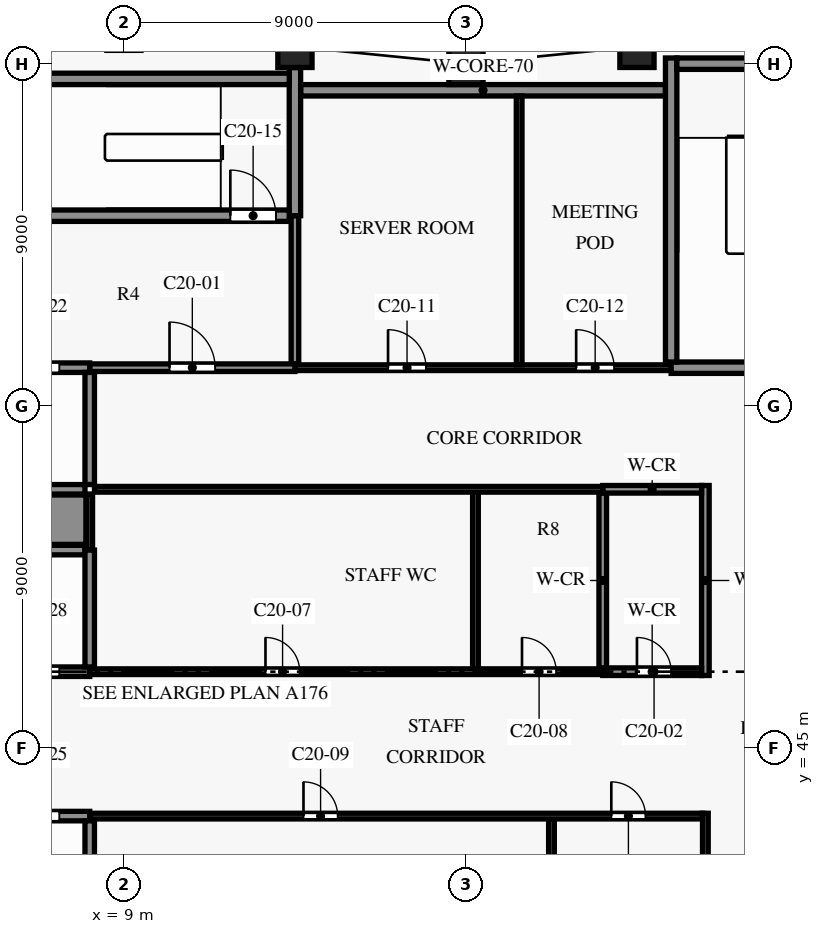
"""IFC4 building model, lengths in metres.
Left out: names, types, materials, properties, quantities, classifications, styles, units other than length and angle.
Written with IfcOpenShell. Run it as: python <this file> out.ifc"""

import sys

from ifc_helpers import new_model, si_unit, direction, frame, frame_2d, origin, origin_2d, place, context, subcontext, project, spatial, rectangle, extrude, element, fill, save


model = new_model("IFC4")
c1 = context("Model", 3, precision=1e-05, world=origin(), true_north=direction((0.0, 1.0)))
c2 = subcontext(c1, "Body", "Model", "MODEL_VIEW")
j1 = project(units=[si_unit("LENGTHUNIT", "METRE"), si_unit("PLANEANGLEUNIT", "RADIAN")], contexts=[c1])
p1 = place(None, origin())
s1 = spatial("IfcSite", under=j1, at=p1, CompositionType="ELEMENT")
p2 = place(p1, origin())
s2 = spatial("IfcBuilding", under=s1, at=p2, CompositionType="ELEMENT")
p3 = place(p2, frame((0.0, 0.0, 143.4)))
s3 = spatial("IfcBuildingStorey", under=s2, at=p3, CompositionType="ELEMENT", Elevation=143.4)
for number, where, z_axis, x_axis in (
    (1, (22.5, 63.45, 0.0), (0.0, 0.0, 1.0), (-0.995, -0.1, 0.0)),
    (2, (18.0, 63.0, 0.0), (0.0, 0.0, 1.0), (-1.0, 0.0, 0.0)),
    (3, (13.5, 63.45, 0.0), (0.0, 0.0, 1.0), (-0.995, 0.1, 0.0)),
):
    element("IfcColumn", number, at=place(p3, frame(where, z_axis=z_axis, x_axis=x_axis)), inside=s3, PredefinedType="COLUMN", context=c2, shape_type="SweptSolid", body=[
        extrude(rectangle(XDim=0.9, YDim=1.1, at=origin_2d()), origin(), (0.0, 0.0, 1.0), 3.8),
    ])
p4 = place(p3, frame((8.1, 43.2, 0.0), z_axis=(0.0, 0.0, 1.0), x_axis=(1.0, 0.0, 0.0)))
e4 = element("IfcWall", 4, at=p4, inside=s3, PredefinedType="PARTITIONING", context=c2, shape_type="SweptSolid", body=[
    extrude(rectangle(XDim=16.125, YDim=0.15, at=frame_2d((8.062, 0.0))), origin(), (0.0, 0.0, 1.0), 3.5),
])
p5 = place(p4, frame((5.625, 0.0, 0.0)))
e5 = element("IfcOpeningElement", 5, at=p5, cuts=e4, PredefinedType="OPENING", context=c2, shape_type="SweptSolid", body=[
    extrude(rectangle(XDim=0.9, YDim=2.1, at=frame_2d((0.45, 1.05))), frame((0.0, 0.085, 0.0), z_axis=(0.0, -1.0, 0.0), x_axis=(1.0, 0.0, 0.0)), (0.0, 0.0, 1.0), 0.17),
])
p6 = place(p4, frame((13.725, 0.0, 0.0)))
e6 = element("IfcOpeningElement", 6, at=p6, cuts=e4, PredefinedType="OPENING", context=c2, shape_type="SweptSolid", body=[
    extrude(rectangle(XDim=0.9, YDim=2.1, at=frame_2d((0.45, 1.05))), frame((0.0, 0.085, 0.0), z_axis=(0.0, -1.0, 0.0), x_axis=(1.0, 0.0, 0.0)), (0.0, 0.0, 1.0), 0.17),
])
p7 = place(p3, frame((0.125, 43.2, 0.0), z_axis=(0.0, 0.0, 1.0), x_axis=(1.0, 0.0, 0.0)))
e7 = element("IfcWall", 7, at=p7, inside=s3, PredefinedType="SHEAR", context=c2, shape_type="SweptSolid", body=[
    extrude(rectangle(XDim=7.975, YDim=0.25, at=frame_2d((3.988, 0.0))), origin(), (0.0, 0.0, 1.0), 3.5),
])
p8 = place(p7, frame((0.675, 0.0, 0.0)))
e8 = element("IfcOpeningElement", 8, at=p8, cuts=e7, PredefinedType="OPENING", context=c2, shape_type="SweptSolid", body=[
    extrude(rectangle(XDim=1.1, YDim=2.1, at=frame_2d((0.55, 1.05))), frame((0.0, 0.135, 0.0), z_axis=(0.0, -1.0, 0.0), x_axis=(1.0, 0.0, 0.0)), (0.0, 0.0, 1.0), 0.27),
])
p9 = place(p7, frame((3.375, 0.0, 0.0)))
e9 = element("IfcOpeningElement", 9, at=p9, cuts=e7, PredefinedType="OPENING", context=c2, shape_type="SweptSolid", body=[
    extrude(rectangle(XDim=1.1, YDim=2.1, at=frame_2d((0.55, 1.05))), frame((0.0, 0.135, 0.0), z_axis=(0.0, -1.0, 0.0), x_axis=(1.0, 0.0, 0.0)), (0.0, 0.0, 1.0), 0.27),
])
p10 = place(p7, frame((6.075, 0.0, 0.0)))
e10 = element("IfcOpeningElement", 10, at=p10, cuts=e7, PredefinedType="OPENING", context=c2, shape_type="SweptSolid", body=[
    extrude(rectangle(XDim=1.1, YDim=2.1, at=frame_2d((0.55, 1.05))), frame((0.0, 0.135, 0.0), z_axis=(0.0, -1.0, 0.0), x_axis=(1.0, 0.0, 0.0)), (0.0, 0.0, 1.0), 0.27),
])
p11 = place(p3, frame((8.1, 47.0, 0.0), z_axis=(0.0, 0.0, 1.0), x_axis=(1.0, 0.0, 0.0)))
e11 = element("IfcWall", 11, at=p11, inside=s3, PredefinedType="PARTITIONING", context=c2, shape_type="SweptSolid", body=[
    extrude(rectangle(XDim=13.5, YDim=0.15, at=frame_2d((6.75, 0.0))), origin(), (0.0, 0.0, 1.0), 3.5),
])
p12 = place(p11, frame((4.625, 0.0, 0.0)))
e12 = element("IfcOpeningElement", 12, at=p12, cuts=e11, PredefinedType="OPENING", context=c2, shape_type="SweptSolid", body=[
    extrude(rectangle(XDim=0.9, YDim=2.1, at=frame_2d((0.45, 1.05))), frame((0.0, 0.085, 0.0), z_axis=(0.0, -1.0, 0.0), x_axis=(1.0, 0.0, 0.0)), (0.0, 0.0, 1.0), 0.17),
])
p13 = place(p11, frame((11.375, 0.0, 0.0)))
e13 = element("IfcOpeningElement", 13, at=p13, cuts=e11, PredefinedType="OPENING", context=c2, shape_type="SweptSolid", body=[
    extrude(rectangle(XDim=0.9, YDim=2.1, at=frame_2d((0.45, 1.05))), frame((0.0, 0.085, 0.0), z_axis=(0.0, -1.0, 0.0), x_axis=(1.0, 0.0, 0.0)), (0.0, 0.0, 1.0), 0.17),
])
p14 = place(p3, frame((21.6, 47.0, 0.0), z_axis=(0.0, 0.0, 1.0), x_axis=(1.0, 0.0, 0.0)))
e14 = element("IfcWall", 14, at=p14, inside=s3, PredefinedType="PARTITIONING", context=c2, shape_type="SweptSolid", body=[
    extrude(rectangle(XDim=2.6, YDim=0.2, at=frame_2d((1.3, 0.0))), origin(), (0.0, 0.0, 1.0), 3.5),
])
p15 = place(p14, frame((0.9, 0.0, 0.0)))
e15 = element("IfcOpeningElement", 15, at=p15, cuts=e14, PredefinedType="OPENING", context=c2, shape_type="SweptSolid", body=[
    extrude(rectangle(XDim=0.9, YDim=2.1, at=frame_2d((0.45, 1.05))), frame((0.0, 0.11, 0.0), z_axis=(0.0, -1.0, 0.0), x_axis=(1.0, 0.0, 0.0)), (0.0, 0.0, 1.0), 0.22),
])
p16 = place(p3, frame((0.125, 47.0, 0.0), z_axis=(0.0, 0.0, 1.0), x_axis=(1.0, 0.0, 0.0)))
e16 = element("IfcWall", 16, at=p16, inside=s3, PredefinedType="SHEAR", context=c2, shape_type="SweptSolid", body=[
    extrude(rectangle(XDim=7.975, YDim=0.25, at=frame_2d((3.988, 0.0))), origin(), (0.0, 0.0, 1.0), 3.5),
])
p17 = place(p16, frame((0.675, 0.0, 0.0)))
e17 = element("IfcOpeningElement", 17, at=p17, cuts=e16, PredefinedType="OPENING", context=c2, shape_type="SweptSolid", body=[
    extrude(rectangle(XDim=1.1, YDim=2.1, at=frame_2d((0.55, 1.05))), frame((0.0, 0.135, 0.0), z_axis=(0.0, -1.0, 0.0), x_axis=(1.0, 0.0, 0.0)), (0.0, 0.0, 1.0), 0.27),
])
p18 = place(p16, frame((3.375, 0.0, 0.0)))
e18 = element("IfcOpeningElement", 18, at=p18, cuts=e16, PredefinedType="OPENING", context=c2, shape_type="SweptSolid", body=[
    extrude(rectangle(XDim=1.1, YDim=2.1, at=frame_2d((0.55, 1.05))), frame((0.0, 0.135, 0.0), z_axis=(0.0, -1.0, 0.0), x_axis=(1.0, 0.0, 0.0)), (0.0, 0.0, 1.0), 0.27),
])
p19 = place(p16, frame((6.075, 0.0, 0.0)))
e19 = element("IfcOpeningElement", 19, at=p19, cuts=e16, PredefinedType="OPENING", context=c2, shape_type="SweptSolid", body=[
    extrude(rectangle(XDim=1.1, YDim=2.1, at=frame_2d((0.55, 1.05))), frame((0.0, 0.135, 0.0), z_axis=(0.0, -1.0, 0.0), x_axis=(1.0, 0.0, 0.0)), (0.0, 0.0, 1.0), 0.27),
])
p20 = place(p3, frame((0.125, 50.2, 0.0), z_axis=(0.0, 0.0, 1.0), x_axis=(1.0, 0.0, 0.0)))
e20 = element("IfcWall", 20, at=p20, inside=s3, PredefinedType="SHEAR", context=c2, shape_type="SweptSolid", body=[
    extrude(rectangle(XDim=7.85, YDim=0.25, at=frame_2d((3.925, 0.0))), origin(), (0.0, 0.0, 1.0), 3.5),
])
p21 = place(p3, frame((-0.125, 51.0, 0.0), z_axis=(0.0, 0.0, 1.0), x_axis=(1.0, 0.0, 0.0)))
e21 = element("IfcWall", 21, at=p21, inside=s3, PredefinedType="SHEAR", context=c2, shape_type="SweptSolid", body=[
    extrude(rectangle(XDim=8.125, YDim=1.3, at=frame_2d((4.062, 0.0))), origin(), (0.0, 0.0, 1.0), 3.5),
])
p22 = place(p3, frame((8.225, 51.8, 0.0), z_axis=(0.0, 0.0, 1.0), x_axis=(1.0, 0.0, 0.0)))
e22 = element("IfcWall", 22, at=p22, inside=s3, PredefinedType="PARTITIONING", context=c2, shape_type="SweptSolid", body=[
    extrude(rectangle(XDim=13.375, YDim=0.15, at=frame_2d((6.688, 0.0))), origin(), (0.0, 0.0, 1.0), 3.5),
])
p23 = place(p3, frame((21.6, 51.8, 0.0), z_axis=(0.0, 0.0, 1.0), x_axis=(1.0, 0.0, 0.0)))
e23 = element("IfcWall", 23, at=p23, inside=s3, PredefinedType="PARTITIONING", context=c2, shape_type="SweptSolid", body=[
    extrude(rectangle(XDim=2.6, YDim=0.2, at=frame_2d((1.3, 0.0))), origin(), (0.0, 0.0, 1.0), 3.5),
])
p24 = place(p3, frame((0.125, 51.8, 0.0), z_axis=(0.0, 0.0, 1.0), x_axis=(1.0, 0.0, 0.0)))
e24 = element("IfcWall", 24, at=p24, inside=s3, PredefinedType="SHEAR", context=c2, shape_type="SweptSolid", body=[
    extrude(rectangle(XDim=7.85, YDim=0.25, at=frame_2d((3.925, 0.0))), origin(), (0.0, 0.0, 1.0), 3.5),
])
p25 = place(p3, frame((8.1, 55.0, 0.0), z_axis=(0.0, 0.0, 1.0), x_axis=(1.0, 0.0, 0.0)))
e25 = element("IfcWall", 25, at=p25, inside=s3, PredefinedType="PARTITIONING", context=c2, shape_type="SweptSolid", body=[
    extrude(rectangle(XDim=5.4, YDim=0.2, at=frame_2d((2.7, 0.0))), origin(), (0.0, 0.0, 1.0), 3.5),
])
p26 = place(p25, frame((2.1, 0.0, 0.0)))
e26 = element("IfcOpeningElement", 26, at=p26, cuts=e25, PredefinedType="OPENING", context=c2, shape_type="SweptSolid", body=[
    extrude(rectangle(XDim=1.2, YDim=2.2, at=frame_2d((0.6, 1.1))), frame((0.0, 0.11, 0.0), z_axis=(0.0, -1.0, 0.0), x_axis=(1.0, 0.0, 0.0)), (0.0, 0.0, 1.0), 0.22),
])
p27 = place(p3, frame((13.5, 55.0, 0.0), z_axis=(0.0, 0.0, 1.0), x_axis=(1.0, 0.0, 0.0)))
e27 = element("IfcWall", 27, at=p27, inside=s3, PredefinedType="PARTITIONING", context=c2, shape_type="SweptSolid", body=[
    extrude(rectangle(XDim=9.9, YDim=0.15, at=frame_2d((4.95, 0.0))), origin(), (0.0, 0.0, 1.0), 3.5),
])
p28 = place(p27, frame((2.45, 0.0, 0.0)))
e28 = element("IfcOpeningElement", 28, at=p28, cuts=e27, PredefinedType="OPENING", context=c2, shape_type="SweptSolid", body=[
    extrude(rectangle(XDim=1.0, YDim=2.1, at=frame_2d((0.5, 1.05))), frame((0.0, 0.085, 0.0), z_axis=(0.0, -1.0, 0.0), x_axis=(1.0, 0.0, 0.0)), (0.0, 0.0, 1.0), 0.17),
])
p29 = place(p27, frame((7.4, 0.0, 0.0)))
e29 = element("IfcOpeningElement", 29, at=p29, cuts=e27, PredefinedType="OPENING", context=c2, shape_type="SweptSolid", body=[
    extrude(rectangle(XDim=1.0, YDim=2.1, at=frame_2d((0.5, 1.05))), frame((0.0, 0.085, 0.0), z_axis=(0.0, -1.0, 0.0), x_axis=(1.0, 0.0, 0.0)), (0.0, 0.0, 1.0), 0.17),
])
p30 = place(p3, frame((0.15, 55.0, 0.0), z_axis=(0.0, 0.0, 1.0), x_axis=(1.0, 0.0, 0.0)))
e30 = element("IfcWall", 30, at=p30, inside=s3, PredefinedType="SHEAR", context=c2, shape_type="SweptSolid", body=[
    extrude(rectangle(XDim=7.95, YDim=0.25, at=frame_2d((3.975, 0.0))), origin(), (0.0, 0.0, 1.0), 3.5),
])
p31 = place(p30, frame((0.65, 0.0, 0.0)))
e31 = element("IfcOpeningElement", 31, at=p31, cuts=e30, PredefinedType="OPENING", context=c2, shape_type="SweptSolid", body=[
    extrude(rectangle(XDim=1.1, YDim=2.1, at=frame_2d((0.55, 1.05))), frame((0.0, 0.135, 0.0), z_axis=(0.0, -1.0, 0.0), x_axis=(1.0, 0.0, 0.0)), (0.0, 0.0, 1.0), 0.27),
])
p32 = place(p30, frame((3.35, 0.0, 0.0)))
e32 = element("IfcOpeningElement", 32, at=p32, cuts=e30, PredefinedType="OPENING", context=c2, shape_type="SweptSolid", body=[
    extrude(rectangle(XDim=1.1, YDim=2.1, at=frame_2d((0.55, 1.05))), frame((0.0, 0.135, 0.0), z_axis=(0.0, -1.0, 0.0), x_axis=(1.0, 0.0, 0.0)), (0.0, 0.0, 1.0), 0.27),
])
p33 = place(p30, frame((6.05, 0.0, 0.0)))
e33 = element("IfcOpeningElement", 33, at=p33, cuts=e30, PredefinedType="OPENING", context=c2, shape_type="SweptSolid", body=[
    extrude(rectangle(XDim=1.1, YDim=2.1, at=frame_2d((0.55, 1.05))), frame((0.0, 0.135, 0.0), z_axis=(0.0, -1.0, 0.0), x_axis=(1.0, 0.0, 0.0)), (0.0, 0.0, 1.0), 0.27),
])
p34 = place(p3, frame((23.4, 55.0, 0.0), z_axis=(0.0, 0.0, 1.0), x_axis=(1.0, 0.0, 0.0)))
e34 = element("IfcWall", 34, at=p34, inside=s3, PredefinedType="SHEAR", context=c2, shape_type="SweptSolid", body=[
    extrude(rectangle(XDim=3.45, YDim=0.3, at=frame_2d((1.725, 0.0))), origin(), (0.0, 0.0, 1.0), 3.5),
])
p35 = place(p3, frame((5.0, 59.0, 0.0), z_axis=(0.0, 0.0, 1.0), x_axis=(1.0, 0.0, 0.0)))
e35 = element("IfcWall", 35, at=p35, inside=s3, PredefinedType="SHEAR", context=c2, shape_type="SweptSolid", body=[
    extrude(rectangle(XDim=8.35, YDim=0.3, at=frame_2d((4.175, 0.0))), origin(), (0.0, 0.0, 1.0), 3.5),
])
p36 = place(p35, frame((6.8, 0.0, 0.0)))
e36 = element("IfcOpeningElement", 36, at=p36, cuts=e35, PredefinedType="OPENING", context=c2, shape_type="SweptSolid", body=[
    extrude(rectangle(XDim=1.2, YDim=2.2, at=frame_2d((0.6, 1.1))), frame((0.0, 0.16, 0.0), z_axis=(0.0, -1.0, 0.0), x_axis=(1.0, 0.0, 0.0)), (0.0, 0.0, 1.0), 0.32),
])
p37 = place(p3, frame((13.65, 62.3, 0.0), z_axis=(0.0, 0.0, 1.0), x_axis=(1.0, 0.0, 0.0)))
e37 = element("IfcWall", 37, at=p37, inside=s3, PredefinedType="SHEAR", context=c2, shape_type="SweptSolid", body=[
    extrude(rectangle(XDim=9.6, YDim=0.3, at=frame_2d((4.8, 0.0))), origin(), (0.0, 0.0, 1.0), 3.5),
])
p38 = place(p3, frame((5.65, 62.6, 0.0), z_axis=(0.0, 0.0, 1.0), x_axis=(1.0, 0.0, 0.0)))
e38 = element("IfcWall", 38, at=p38, inside=s3, PredefinedType="SHEAR", context=c2, shape_type="SweptSolid", body=[
    extrude(rectangle(XDim=7.7, YDim=0.3, at=frame_2d((3.85, 0.0))), origin(), (0.0, 0.0, 1.0), 3.5),
])
p39 = place(p3, frame((23.55, 63.0, 0.0), z_axis=(0.0, 0.0, 1.0), x_axis=(1.0, 0.0, 0.0)))
e39 = element("IfcWall", 39, at=p39, inside=s3, PredefinedType="SHEAR", context=c2, shape_type="SweptSolid", body=[
    extrude(rectangle(XDim=3.3, YDim=0.3, at=frame_2d((1.65, 0.0))), origin(), (0.0, 0.0, 1.0), 3.5),
])
p40 = place(p3, frame((8.1, 50.2, 0.0), z_axis=(0.0, 0.0, 1.0), x_axis=(0.0, 1.0, 0.0)))
e40 = element("IfcWall", 40, at=p40, inside=s3, PredefinedType="PARTITIONING", context=c2, shape_type="SweptSolid", body=[
    extrude(rectangle(XDim=1.475, YDim=0.15, at=frame_2d((0.738, 0.0))), origin(), (0.0, 0.0, 1.0), 3.5),
])
p41 = place(p3, frame((8.1, 40.125, 0.0), z_axis=(0.0, 0.0, 1.0), x_axis=(0.0, 1.0, 0.0)))
e41 = element("IfcWall", 41, at=p41, inside=s3, PredefinedType="SHEAR", context=c2, shape_type="SweptSolid", body=[
    extrude(rectangle(XDim=2.95, YDim=0.25, at=frame_2d((1.475, 0.0))), origin(), (0.0, 0.0, 1.0), 3.5),
])
p42 = place(p3, frame((8.1, 47.125, 0.0), z_axis=(0.0, 0.0, 1.0), x_axis=(0.0, 1.0, 0.0)))
e42 = element("IfcWall", 42, at=p42, inside=s3, PredefinedType="SHEAR", context=c2, shape_type="SweptSolid", body=[
    extrude(rectangle(XDim=3.075, YDim=0.25, at=frame_2d((1.538, 0.0))), origin(), (0.0, 0.0, 1.0), 3.5),
])
p43 = place(p3, frame((8.1, 51.925, 0.0), z_axis=(0.0, 0.0, 1.0), x_axis=(0.0, 1.0, 0.0)))
e43 = element("IfcWall", 43, at=p43, inside=s3, PredefinedType="SHEAR", context=c2, shape_type="SweptSolid", body=[
    extrude(rectangle(XDim=2.95, YDim=0.25, at=frame_2d((1.475, 0.0))), origin(), (0.0, 0.0, 1.0), 3.5),
])
p44 = place(p3, frame((13.5, 55.1, 0.0), z_axis=(0.0, 0.0, 1.0), x_axis=(0.0, 1.0, 0.0)))
e44 = element("IfcWall", 44, at=p44, inside=s3, PredefinedType="PARTITIONING", context=c2, shape_type="SweptSolid", body=[
    extrude(rectangle(XDim=3.9, YDim=0.2, at=frame_2d((1.95, 0.0))), origin(), (0.0, 0.0, 1.0), 3.5),
])
p45 = place(p3, frame((13.5, 59.0, 0.0), z_axis=(0.0, 0.0, 1.0), x_axis=(0.0, 1.0, 0.0)))
e45 = element("IfcWall", 45, at=p45, inside=s3, PredefinedType="SHEAR", context=c2, shape_type="SweptSolid", body=[
    extrude(rectangle(XDim=3.897, YDim=0.3, at=frame_2d((1.949, 0.0))), origin(), (0.0, 0.0, 1.0), 3.5),
])
p46 = place(p3, frame((18.25, 47.075, 0.0), z_axis=(0.0, 0.0, 1.0), x_axis=(0.0, 1.0, 0.0)))
e46 = element("IfcWall", 46, at=p46, inside=s3, PredefinedType="PARTITIONING", context=c2, shape_type="SweptSolid", body=[
    extrude(rectangle(XDim=4.65, YDim=0.15, at=frame_2d((2.325, 0.0))), origin(), (0.0, 0.0, 1.0), 3.5),
])
p47 = place(p3, frame((19.4, 55.075, 0.0), z_axis=(0.0, 0.0, 1.0), x_axis=(0.0, 1.0, 0.0)))
e47 = element("IfcWall", 47, at=p47, inside=s3, PredefinedType="PARTITIONING", context=c2, shape_type="SweptSolid", body=[
    extrude(rectangle(XDim=7.075, YDim=0.15, at=frame_2d((3.538, 0.0))), origin(), (0.0, 0.0, 1.0), 3.5),
])
p48 = place(p3, frame((20.25, 40.075, 0.0), z_axis=(0.0, 0.0, 1.0), x_axis=(0.0, 1.0, 0.0)))
e48 = element("IfcWall", 48, at=p48, inside=s3, PredefinedType="PARTITIONING", context=c2, shape_type="SweptSolid", body=[
    extrude(rectangle(XDim=3.05, YDim=0.15, at=frame_2d((1.525, 0.0))), origin(), (0.0, 0.0, 1.0), 3.5),
])
p49 = place(p3, frame((21.6, 47.1, 0.0), z_axis=(0.0, 0.0, 1.0), x_axis=(0.0, 1.0, 0.0)))
e49 = element("IfcWall", 49, at=p49, inside=s3, PredefinedType="PARTITIONING", context=c2, shape_type="SweptSolid", body=[
    extrude(rectangle(XDim=4.6, YDim=0.2, at=frame_2d((2.3, 0.0))), origin(), (0.0, 0.0, 1.0), 3.5),
])
p50 = place(p3, frame((23.4, 55.15, 0.0), z_axis=(0.0, 0.0, 1.0), x_axis=(0.0, 1.0, 0.0)))
e50 = element("IfcWall", 50, at=p50, inside=s3, PredefinedType="SHEAR", context=c2, shape_type="SweptSolid", body=[
    extrude(rectangle(XDim=8.0, YDim=0.3, at=frame_2d((4.0, 0.0))), origin(), (0.0, 0.0, 1.0), 3.5),
])
p51 = place(p3, frame((24.3, 35.925, 0.0), z_axis=(0.0, 0.0, 1.0), x_axis=(0.0, 1.0, 0.0)))
e51 = element("IfcWall", 51, at=p51, inside=s3, PredefinedType="PARTITIONING", context=c2, shape_type="SweptSolid", body=[
    extrude(rectangle(XDim=7.35, YDim=0.15, at=frame_2d((3.675, 0.0))), origin(), (0.0, 0.0, 1.0), 3.5),
])
p52 = place(p3, frame((24.3, 46.9, 0.0), z_axis=(0.0, 0.0, 1.0), x_axis=(0.0, 1.0, 0.0)))
e52 = element("IfcWall", 52, at=p52, inside=s3, PredefinedType="SHEAR", context=c2, shape_type="SweptSolid", body=[
    extrude(rectangle(XDim=5.0, YDim=0.2, at=frame_2d((2.5, 0.0))), origin(), (0.0, 0.0, 1.0), 3.5),
])
p53 = place(p26, origin())
e53 = element("IfcDoor", 53, at=p53, inside=s3, OperationType="SINGLE_SWING_RIGHT", PredefinedType="DOOR", context=c2, shape_type="SweptSolid", body=[
    extrude(rectangle(XDim=1.2, YDim=2.2, at=frame_2d((0.6, 1.1))), frame((0.0, 0.025, 0.0), z_axis=(0.0, -1.0, 0.0), x_axis=(1.0, 0.0, 0.0)), (0.0, 0.0, 1.0), 0.05),
])
fill(e26, e53)
p54 = place(p15, origin())
e54 = element("IfcDoor", 54, at=p54, inside=s3, OperationType="SINGLE_SWING_LEFT", PredefinedType="DOOR", context=c2, shape_type="SweptSolid", body=[
    extrude(rectangle(XDim=0.9, YDim=2.1, at=frame_2d((0.45, 1.05))), frame((0.0, 0.025, 0.0), z_axis=(0.0, -1.0, 0.0), x_axis=(1.0, 0.0, 0.0)), (0.0, 0.0, 1.0), 0.05),
])
fill(e15, e54)
p55 = place(p12, origin())
e55 = element("IfcDoor", 55, at=p55, inside=s3, OperationType="SINGLE_SWING_LEFT", PredefinedType="DOOR", context=c2, shape_type="SweptSolid", body=[
    extrude(rectangle(XDim=0.9, YDim=2.1, at=frame_2d((0.45, 1.05))), frame((0.0, 0.025, 0.0), z_axis=(0.0, -1.0, 0.0), x_axis=(1.0, 0.0, 0.0)), (0.0, 0.0, 1.0), 0.05),
])
fill(e12, e55)
p56 = place(p13, origin())
e56 = element("IfcDoor", 56, at=p56, inside=s3, OperationType="SINGLE_SWING_RIGHT", PredefinedType="DOOR", context=c2, shape_type="SweptSolid", body=[
    extrude(rectangle(XDim=0.9, YDim=2.1, at=frame_2d((0.45, 1.05))), frame((0.0, 0.025, 0.0), z_axis=(0.0, -1.0, 0.0), x_axis=(1.0, 0.0, 0.0)), (0.0, 0.0, 1.0), 0.05),
])
fill(e13, e56)
p57 = place(p5, origin())
e57 = element("IfcDoor", 57, at=p57, inside=s3, OperationType="SINGLE_SWING_RIGHT", PredefinedType="DOOR", context=c2, shape_type="SweptSolid", body=[
    extrude(rectangle(XDim=0.9, YDim=2.1, at=frame_2d((0.45, 1.05))), frame((0.0, 0.025, 0.0), z_axis=(0.0, -1.0, 0.0), x_axis=(1.0, 0.0, 0.0)), (0.0, 0.0, 1.0), 0.05),
])
fill(e5, e57)
p58 = place(p6, origin())
e58 = element("IfcDoor", 58, at=p58, inside=s3, OperationType="SINGLE_SWING_LEFT", PredefinedType="DOOR", context=c2, shape_type="SweptSolid", body=[
    extrude(rectangle(XDim=0.9, YDim=2.1, at=frame_2d((0.45, 1.05))), frame((0.0, 0.025, 0.0), z_axis=(0.0, -1.0, 0.0), x_axis=(1.0, 0.0, 0.0)), (0.0, 0.0, 1.0), 0.05),
])
fill(e6, e58)
p59 = place(p28, origin())
e59 = element("IfcDoor", 59, at=p59, inside=s3, OperationType="SINGLE_SWING_LEFT", PredefinedType="DOOR", context=c2, shape_type="SweptSolid", body=[
    extrude(rectangle(XDim=1.0, YDim=2.1, at=frame_2d((0.5, 1.05))), frame((0.0, 0.025, 0.0), z_axis=(0.0, -1.0, 0.0), x_axis=(1.0, 0.0, 0.0)), (0.0, 0.0, 1.0), 0.05),
])
fill(e28, e59)
p60 = place(p29, origin())
e60 = element("IfcDoor", 60, at=p60, inside=s3, OperationType="SINGLE_SWING_RIGHT", PredefinedType="DOOR", context=c2, shape_type="SweptSolid", body=[
    extrude(rectangle(XDim=1.0, YDim=2.1, at=frame_2d((0.5, 1.05))), frame((0.0, 0.025, 0.0), z_axis=(0.0, -1.0, 0.0), x_axis=(1.0, 0.0, 0.0)), (0.0, 0.0, 1.0), 0.05),
])
fill(e29, e60)
p61 = place(p36, origin())
e61 = element("IfcDoor", 61, at=p61, inside=s3, OperationType="SINGLE_SWING_RIGHT", PredefinedType="DOOR", context=c2, shape_type="SweptSolid", body=[
    extrude(rectangle(XDim=1.2, YDim=2.2, at=frame_2d((0.6, 1.1))), frame((0.0, 0.025, 0.0), z_axis=(0.0, -1.0, 0.0), x_axis=(1.0, 0.0, 0.0)), (0.0, 0.0, 1.0), 0.05),
])
fill(e36, e61)
p62 = place(p33, origin())
e62 = element("IfcDoor", 62, at=p62, inside=s3, OperationType="DOUBLE_DOOR_SLIDING", PredefinedType="DOOR", context=c2, shape_type="SweptSolid", body=[
    extrude(rectangle(XDim=1.1, YDim=2.1, at=frame_2d((0.55, 1.05))), frame((0.0, 0.025, 0.0), z_axis=(0.0, -1.0, 0.0), x_axis=(1.0, 0.0, 0.0)), (0.0, 0.0, 1.0), 0.05),
])
fill(e33, e62)
p63 = place(p10, origin())
e63 = element("IfcDoor", 63, at=p63, inside=s3, OperationType="DOUBLE_DOOR_SLIDING", PredefinedType="DOOR", context=c2, shape_type="SweptSolid", body=[
    extrude(rectangle(XDim=1.1, YDim=2.1, at=frame_2d((0.55, 1.05))), frame((0.0, 0.025, 0.0), z_axis=(0.0, -1.0, 0.0), x_axis=(1.0, 0.0, 0.0)), (0.0, 0.0, 1.0), 0.05),
])
fill(e10, e63)
p64 = place(p19, origin())
e64 = element("IfcDoor", 64, at=p64, inside=s3, OperationType="DOUBLE_DOOR_SLIDING", PredefinedType="DOOR", context=c2, shape_type="SweptSolid", body=[
    extrude(rectangle(XDim=1.1, YDim=2.1, at=frame_2d((0.55, 1.05))), frame((0.0, 0.025, 0.0), z_axis=(0.0, -1.0, 0.0), x_axis=(1.0, 0.0, 0.0)), (0.0, 0.0, 1.0), 0.05),
])
fill(e19, e64)
save(model, sys.argv[1])
